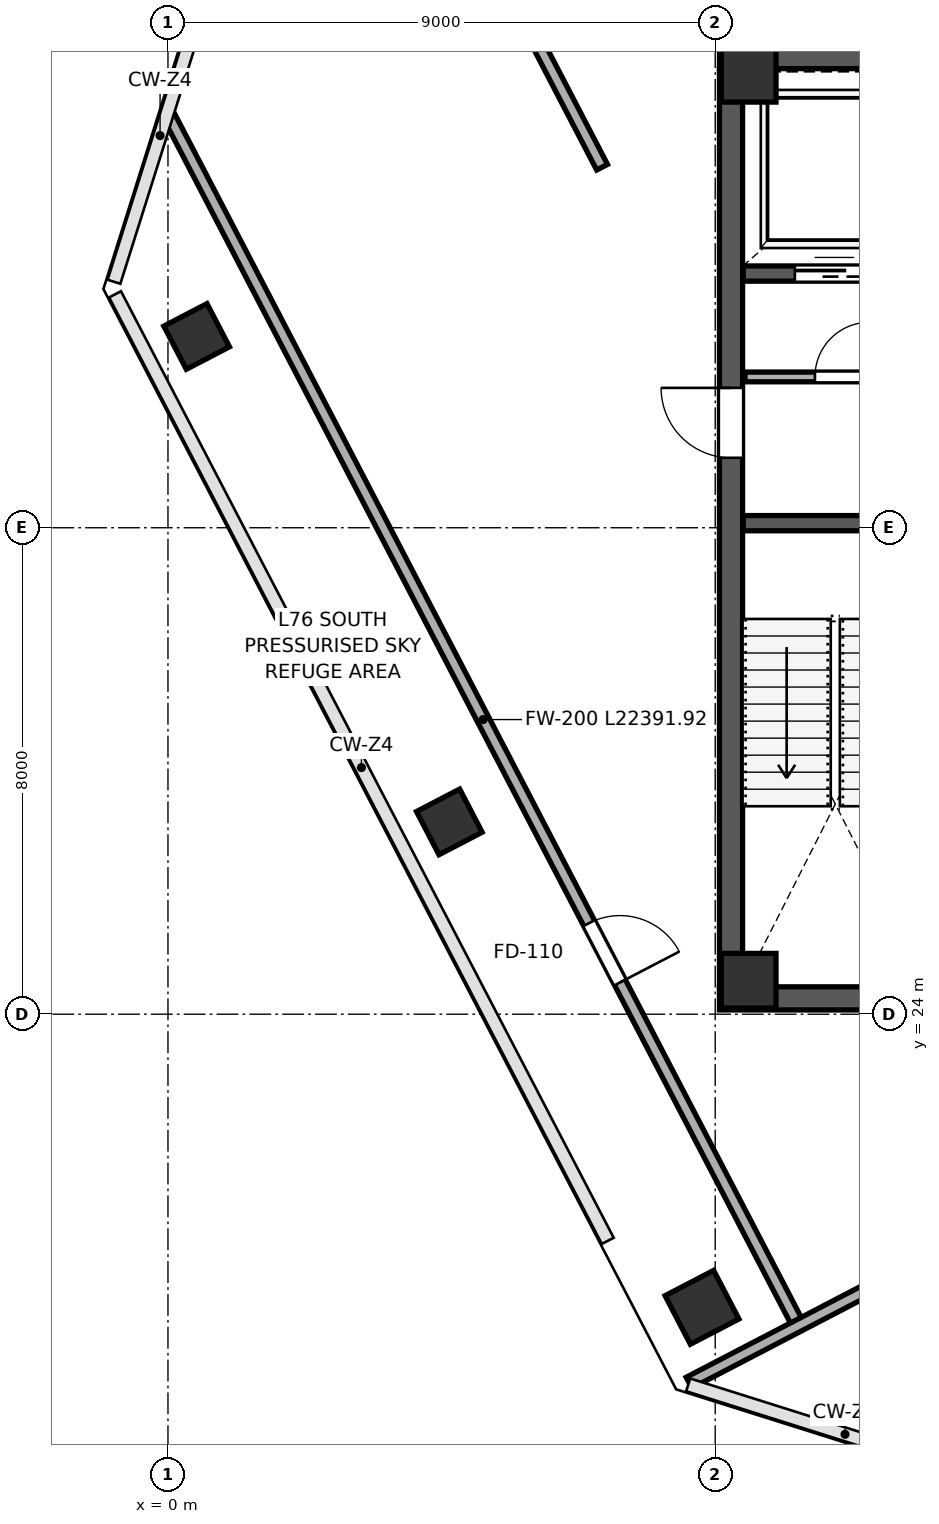
"""IFC4 building model, lengths in metres.
Left out: names, types, materials, properties, quantities, classifications, styles, units other than length and angle.
Written with IfcOpenShell. Run it as: python <this file> out.ifc"""

import sys

from ifc_helpers import new_model, si_unit, direction, frame, frame_2d, origin, origin_2d, place, context, subcontext, project, spatial, rectangle, extrude, clip, halfspace, source, transform, mapped, element, fill, save


model = new_model("IFC4")
c1 = context("Model", 3, precision=1e-05, world=origin(), true_north=direction((0.0, 1.0)))
c2 = subcontext(c1, "Body", "Model", "MODEL_VIEW")
j1 = project(units=[si_unit("LENGTHUNIT", "METRE"), si_unit("PLANEANGLEUNIT", "RADIAN")], contexts=[c1])
p1 = place(None, origin())
s1 = spatial("IfcSite", under=j1, at=p1, CompositionType="ELEMENT")
p2 = place(p1, origin())
s2 = spatial("IfcBuilding", under=s1, at=p2, CompositionType="ELEMENT")
p3 = place(p2, frame((0.0, 0.0, 336.6)))
s3 = spatial("IfcBuildingStorey", under=s2, at=p3, CompositionType="ELEMENT", Elevation=336.6)
m1 = source(origin(), c2, "Body", "SweptSolid", [
    extrude(rectangle(XDim=0.9, YDim=0.9, at=origin_2d()), origin(), (0.0, 0.0, 1.0), 4.198),
])
for number, where, z_axis, x_axis in (
    (1, (9.55, 24.55, 0.001), (0.0, 0.0, 1.0), (1.0, 0.0, 0.0)),
    (2, (9.55, 39.45, 0.001), (0.0, 0.0, 1.0), (1.0, 0.0, 0.0)),
):
    element("IfcColumn", number, at=place(p3, frame(where, z_axis=z_axis, x_axis=x_axis)), inside=s3, PredefinedType="COLUMN", context=c2, shape_type="MappedRepresentation", body=[
        mapped(m1, transform((0.0, 0.0, 0.0), scale=1.0)),
    ])
p4 = place(p3, frame((0.472, 35.146, 0.0), z_axis=(0.03655416982, 0.212570444061, 0.976461775483), x_axis=(0.308281350475, -0.931857999883, 0.191319829091)))
e3 = element("IfcColumn", 3, at=p4, inside=s3, PredefinedType="COLUMN", context=c2, shape_type="Clipping", body=[
    clip(clip(extrude(rectangle(XDim=0.8, YDim=0.8, at=origin_2d()), origin(), (0.0, 0.0, 1.0), 4.301), halfspace(frame((0.0, 0.0, 0.12), z_axis=(0.0, 0.0, -1.0), x_axis=(1.0, 0.0, 0.0)), False)), halfspace(frame((0.0, 0.0, 4.181), z_axis=(0.0, 0.0, 1.0), x_axis=(1.0, 0.0, 0.0)), False)),
])
p5 = place(p3, frame((4.627, 27.163, 0.0), z_axis=(-0.045635098357, 0.17344768586, 0.983785209315), x_axis=(0.668587973504, -0.726417077896, 0.159085985009)))
e4 = element("IfcColumn", 4, at=p5, inside=s3, PredefinedType="COLUMN", context=c2, shape_type="Clipping", body=[
    clip(clip(extrude(rectangle(XDim=0.8, YDim=0.8, at=origin_2d()), origin(), (0.0, 0.0, 1.0), 4.269), halfspace(frame((0.0, 0.0, 0.099), z_axis=(0.0, 0.0, -1.0), x_axis=(1.0, 0.0, 0.0)), False)), halfspace(frame((0.0, 0.0, 4.17), z_axis=(0.0, 0.0, 1.0), x_axis=(1.0, 0.0, 0.0)), False)),
])
p6 = place(p3, frame((8.783, 19.179, 0.0), z_axis=(-0.128034783352, 0.132662546605, 0.982856929049), x_axis=(0.937669793339, -0.306644177065, 0.16353809138)))
e5 = element("IfcColumn", 5, at=p6, inside=s3, PredefinedType="COLUMN", context=c2, shape_type="Clipping", body=[
    clip(clip(extrude(rectangle(XDim=0.9, YDim=0.9, at=origin_2d()), origin(), (0.0, 0.0, 1.0), 4.273), halfspace(frame((0.0, 0.0, 0.115), z_axis=(0.0, 0.0, -1.0), x_axis=(1.0, 0.0, 0.0)), False)), halfspace(frame((0.0, 0.0, 4.159), z_axis=(0.0, 0.0, 1.0), x_axis=(1.0, 0.0, 0.0)), False)),
])
p7 = place(p3, frame((9.26, 24.45, 0.0), z_axis=(0.0, 0.0, 1.0), x_axis=(0.0, 1.0, 0.0)))
e6 = element("IfcWall", 6, at=p7, inside=s3, PredefinedType="SHEAR", context=c2, shape_type="SweptSolid", body=[
    extrude(rectangle(XDim=15.1, YDim=0.38, at=frame_2d((7.55, 0.0))), origin(), (0.0, 0.0, 1.0), 3.96),
])
p8 = place(p7, frame((8.7, 0.0, 0.0)))
e7 = element("IfcOpeningElement", 7, at=p8, cuts=e6, PredefinedType="OPENING", context=c2, shape_type="SweptSolid", body=[
    extrude(rectangle(XDim=1.15, YDim=2.2, at=frame_2d((0.575, 1.1))), frame((0.0, 0.2, 0.0), z_axis=(0.0, -1.0, 0.0), x_axis=(1.0, 0.0, 0.0)), (0.0, 0.0, 1.0), 0.4),
])
for number, where, z_axis, x_axis in (
    (8, (9.07, 24.26, 0.0), (0.0, 0.0, 1.0), (1.0, 0.0, 0.0)),
    (9, (9.07, 39.74, 0.0), (0.0, 0.0, 1.0), (1.0, 0.0, 0.0)),
):
    element("IfcWall", number, at=place(p3, frame(where, z_axis=z_axis, x_axis=x_axis)), inside=s3, PredefinedType="SHEAR", context=c2, shape_type="SweptSolid", body=[
        extrude(rectangle(XDim=17.86, YDim=0.38, at=frame_2d((8.93, 0.0))), origin(), (0.0, 0.0, 1.0), 3.96),
    ])
p9 = place(p3, frame((9.46, 32.075, 0.0), z_axis=(0.0, 0.0, 1.0), x_axis=(1.0, 0.0, 0.0)))
e10 = element("IfcWall", 10, at=p9, inside=s3, PredefinedType="SHEAR", context=c2, shape_type="SweptSolid", body=[
    extrude(rectangle(XDim=3.29, YDim=0.25, at=frame_2d((1.645, 0.0))), origin(), (0.0, 0.0, 1.0), 3.96),
])
p10 = place(p3, frame((9.46, 36.18, 0.0), z_axis=(0.0, 0.0, 1.0), x_axis=(1.0, 0.0, 0.0)))
e11 = element("IfcWall", 11, at=p10, inside=s3, PredefinedType="SHEAR", context=c2, shape_type="SweptSolid", body=[
    extrude(rectangle(XDim=3.79, YDim=0.25, at=frame_2d((1.895, 0.0))), origin(), (0.0, 0.0, 1.0), 3.96),
])
p11 = place(p10, frame((2.62, 0.0, 0.0)))
e12 = element("IfcOpeningElement", 12, at=p11, cuts=e11, PredefinedType="OPENING", context=c2, shape_type="SweptSolid", body=[
    extrude(rectangle(XDim=0.85, YDim=2.1, at=frame_2d((0.425, 1.05))), frame((0.0, 0.135, 0.0), z_axis=(0.0, -1.0, 0.0), x_axis=(1.0, 0.0, 0.0)), (0.0, 0.0, 1.0), 0.27),
])
p12 = place(p10, frame((0.85, 0.0, 0.0)))
e13 = element("IfcOpeningElement", 13, at=p12, cuts=e11, PredefinedType="OPENING", context=c2, shape_type="SweptSolid", body=[
    extrude(rectangle(XDim=1.3, YDim=2.25, at=frame_2d((0.65, 1.125))), frame((0.0, 0.135, 0.0), z_axis=(0.0, -1.0, 0.0), x_axis=(1.0, 0.0, 0.0)), (0.0, 0.0, 1.0), 0.27),
])
p13 = place(p3, frame((9.49, 34.48, 0.0), z_axis=(0.0, 0.0, 1.0), x_axis=(1.0, 0.0, 0.0)))
e14 = element("IfcWall", 14, at=p13, inside=s3, PredefinedType="PARTITIONING", context=c2, shape_type="SweptSolid", body=[
    extrude(rectangle(XDim=3.7, YDim=0.16, at=frame_2d((1.85, 0.0))), origin(), (0.0, 0.0, 1.0), 3.96),
])
p14 = place(p13, frame((1.15, 0.0, 0.0)))
e15 = element("IfcOpeningElement", 15, at=p14, cuts=e14, PredefinedType="OPENING", context=c2, shape_type="SweptSolid", body=[
    extrude(rectangle(XDim=0.9, YDim=2.15, at=frame_2d((0.45, 1.075))), frame((0.0, 0.09, 0.0), z_axis=(0.0, -1.0, 0.0), x_axis=(1.0, 0.0, 0.0)), (0.0, 0.0, 1.0), 0.18),
])
p15 = place(p3, frame((0.013, 38.776, 0.0), z_axis=(0.0, 0.0, 1.0), x_axis=(0.461746796058, -0.887011779138, 0.0)))
e16 = element("IfcWall", 16, at=p15, inside=s3, PredefinedType="SOLIDWALL", context=c2, shape_type="SweptSolid", body=[
    extrude(rectangle(XDim=22.392, YDim=0.2, at=frame_2d((11.196, 0.0))), origin(), (0.0, 0.0, 1.0), 3.96),
])
p16 = place(p15, frame((14.97, 0.0, 0.0)))
e17 = element("IfcOpeningElement", 17, at=p16, cuts=e16, PredefinedType="OPENING", context=c2, shape_type="SweptSolid", body=[
    extrude(rectangle(XDim=1.1, YDim=2.2, at=frame_2d((0.55, 1.1))), frame((0.0, 0.11, 0.0), z_axis=(0.0, -1.0, 0.0), x_axis=(1.0, 0.0, 0.0)), (0.0, 0.0, 1.0), 0.22),
])
p17 = place(p3, frame((8.569, 17.94, 0.0), z_axis=(0.0, 0.0, 1.0), x_axis=(0.88700833088, 0.461753420073, 0.0)))
e18 = element("IfcWall", 18, at=p17, inside=s3, PredefinedType="SOLIDWALL", context=c2, shape_type="SweptSolid", body=[
    extrude(rectangle(XDim=12.91, YDim=0.2, at=frame_2d((6.455, 0.0))), origin(), (0.0, 0.0, 1.0), 3.96),
])
p18 = place(p3, frame((4.54, 42.923, 0.0), z_axis=(0.0, 0.0, 1.0), x_axis=(0.461759584335, -0.887005121899, 0.0)))
e19 = element("IfcWall", 19, at=p18, inside=s3, PredefinedType="SOLIDWALL", context=c2, shape_type="SweptSolid", body=[
    extrude(rectangle(XDim=5.63, YDim=0.2, at=frame_2d((2.815, 0.0))), origin(), (0.0, 0.0, 1.0), 3.96),
])
m2 = source(origin(), c2, "Body", "SweptSolid", [
    extrude(rectangle(XDim=1.15, YDim=2.2, at=frame_2d((0.575, 1.1))), frame((0.0, 0.025, 0.0), z_axis=(0.0, -1.0, 0.0), x_axis=(1.0, 0.0, 0.0)), (0.0, 0.0, 1.0), 0.05),
])
p19 = place(p8, origin())
e20 = element("IfcDoor", 20, at=p19, inside=s3, OperationType="SINGLE_SWING_RIGHT", PredefinedType="DOOR", context=c2, shape_type="MappedRepresentation", body=[
    mapped(m2, transform((0.0, 0.0, 0.0), scale=1.0)),
])
fill(e7, e20)
m3 = source(origin(), c2, "Body", "SweptSolid", [
    extrude(rectangle(XDim=1.3, YDim=2.25, at=frame_2d((0.65, 1.125))), frame((0.0, 0.025, 0.0), z_axis=(0.0, -1.0, 0.0), x_axis=(1.0, 0.0, 0.0)), (0.0, 0.0, 1.0), 0.05),
])
p20 = place(p12, origin())
e21 = element("IfcDoor", 21, at=p20, inside=s3, OperationType="SLIDING_TO_LEFT", PredefinedType="DOOR", context=c2, shape_type="MappedRepresentation", body=[
    mapped(m3, transform((0.0, 0.0, 0.0), scale=1.0)),
])
fill(e13, e21)
m4 = source(origin(), c2, "Body", "SweptSolid", [
    extrude(rectangle(XDim=0.9, YDim=2.15, at=frame_2d((0.45, 1.075))), frame((0.0, 0.025, 0.0), z_axis=(0.0, -1.0, 0.0), x_axis=(1.0, 0.0, 0.0)), (0.0, 0.0, 1.0), 0.05),
])
p21 = place(p14, origin())
e22 = element("IfcDoor", 22, at=p21, inside=s3, OperationType="SINGLE_SWING_RIGHT", PredefinedType="DOOR", context=c2, shape_type="MappedRepresentation", body=[
    mapped(m4, transform((0.0, 0.0, 0.0), scale=1.0)),
])
fill(e15, e22)
m5 = source(origin(), c2, "Body", "SweptSolid", [
    extrude(rectangle(XDim=1.1, YDim=2.2, at=frame_2d((0.55, 1.1))), frame((0.0, 0.025, 0.0), z_axis=(0.0, -1.0, 0.0), x_axis=(1.0, 0.0, 0.0)), (0.0, 0.0, 1.0), 0.05),
])
p22 = place(p16, origin())
e23 = element("IfcDoor", 23, at=p22, inside=s3, OperationType="SINGLE_SWING_RIGHT", PredefinedType="DOOR", context=c2, shape_type="MappedRepresentation", body=[
    mapped(m5, transform((0.0, 0.0, 0.0), scale=1.0)),
])
fill(e17, e23)
save(model, sys.argv[1])
